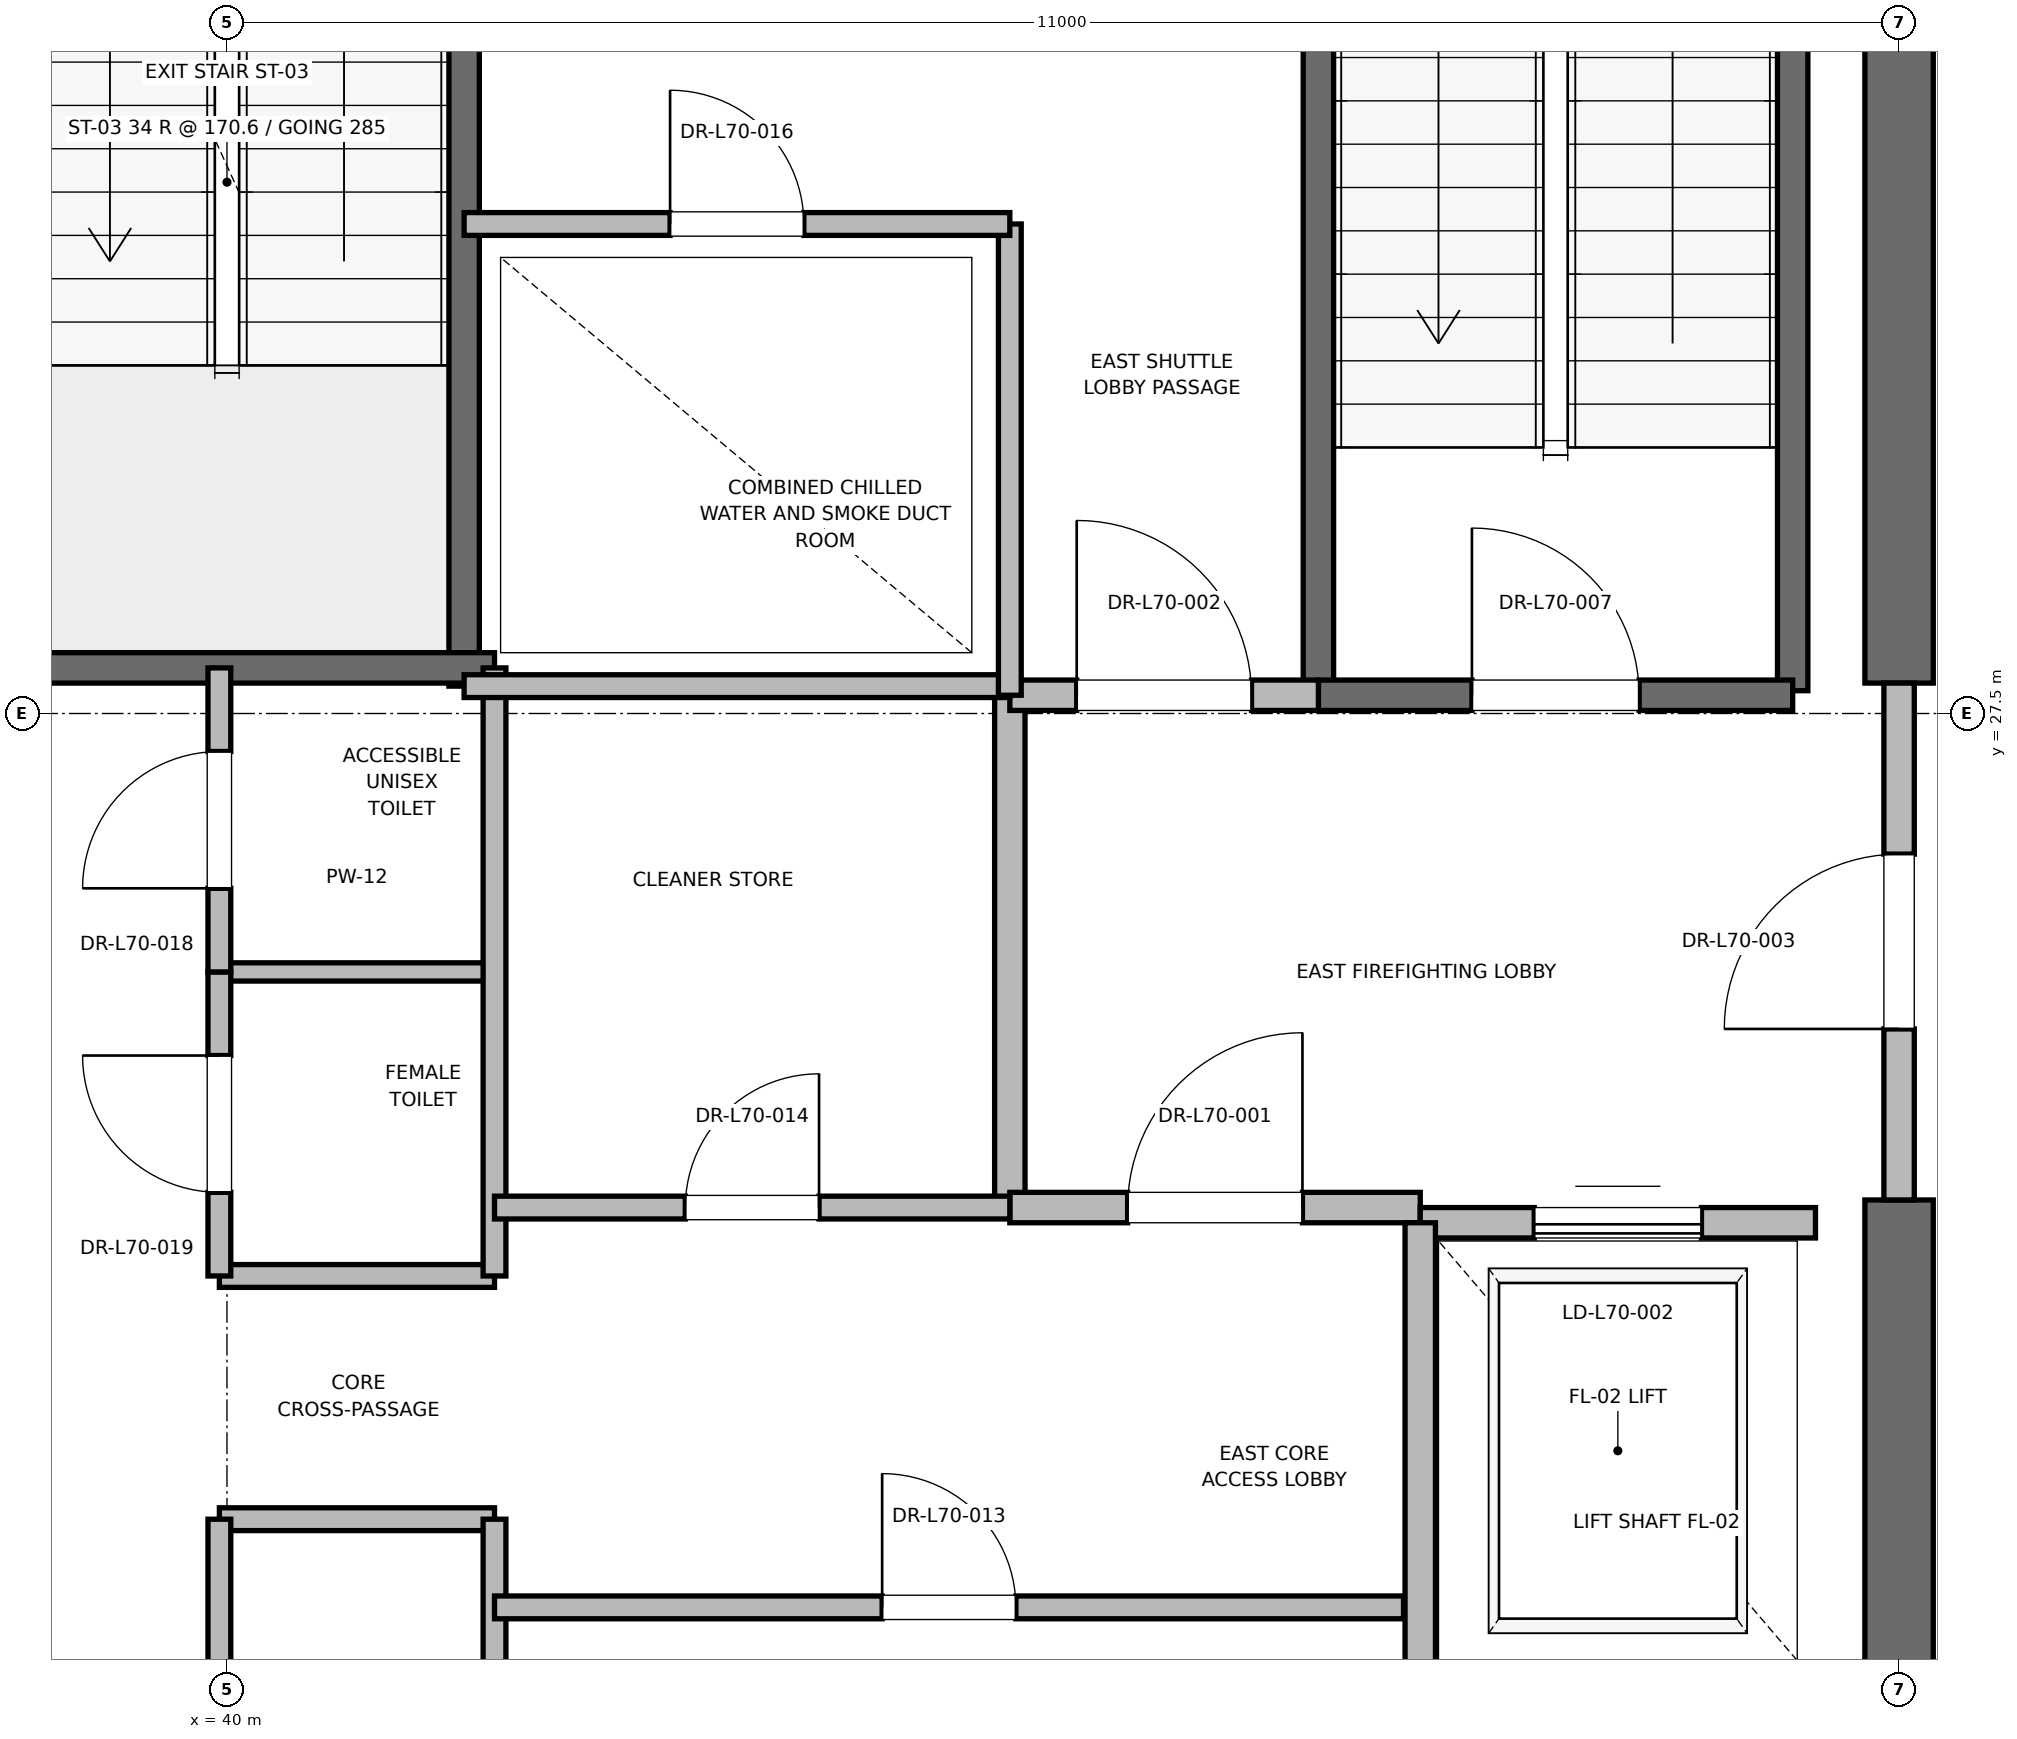
"""IFC4 building model, lengths in metres.
Left out: names, types, materials, properties, quantities, classifications, styles, units other than length and angle.
Written with IfcOpenShell. Run it as: python <this file> out.ifc"""

import sys

from ifc_helpers import new_model, si_unit, direction, frame, frame_2d, origin, place, context, subcontext, project, spatial, rectangle, extrude, element, fill, save


model = new_model("IFC4")
c1 = context("Model", 3, precision=1e-05, world=origin(), true_north=direction((0.0, 1.0)))
c2 = subcontext(c1, "Body", "Model", "MODEL_VIEW")
j1 = project(units=[si_unit("LENGTHUNIT", "METRE"), si_unit("PLANEANGLEUNIT", "RADIAN")], contexts=[c1])
p1 = place(None, origin())
s1 = spatial("IfcSite", under=j1, at=p1, CompositionType="ELEMENT")
p2 = place(p1, origin())
s2 = spatial("IfcBuilding", under=s1, at=p2, CompositionType="ELEMENT")
p3 = place(p2, frame((0.0, 0.0, 301.0)))
s3 = spatial("IfcBuildingStorey", under=s2, at=p3, CompositionType="ELEMENT", Elevation=301.0)
p4 = place(p3, frame((51.0, 18.5, 0.0), z_axis=(0.0, 0.0, 1.0), x_axis=(0.0, 1.0, 0.0)))
e1 = element("IfcWall", 1, at=p4, inside=s3, PredefinedType="SHEAR", context=c2, shape_type="SweptSolid", body=[
    extrude(rectangle(XDim=5.8, YDim=0.45, at=frame_2d((2.9, 0.0))), origin(), (0.0, 0.0, 1.0), 5.585),
])
p5 = place(p3, frame((51.0, 27.7, 0.0), z_axis=(0.0, 0.0, 1.0), x_axis=(0.0, 1.0, 0.0)))
e2 = element("IfcWall", 2, at=p5, inside=s3, PredefinedType="SHEAR", context=c2, shape_type="SweptSolid", body=[
    extrude(rectangle(XDim=8.8, YDim=0.45, at=frame_2d((4.4, 0.0))), origin(), (0.0, 0.0, 1.0), 5.585),
])
p6 = place(p3, frame((50.3, 27.65, 0.0), z_axis=(0.0, 0.0, 1.0), x_axis=(0.0, 1.0, 0.0)))
e3 = element("IfcWall", 3, at=p6, inside=s3, PredefinedType="SOLIDWALL", context=c2, shape_type="SweptSolid", body=[
    extrude(rectangle(XDim=8.15, YDim=0.2, at=frame_2d((4.075, 0.0))), origin(), (0.0, 0.0, 1.0), 5.585),
])
p7 = place(p3, frame((47.18, 27.62, 0.0), z_axis=(0.0, 0.0, 1.0), x_axis=(0.0, 1.0, 0.0)))
e4 = element("IfcWall", 4, at=p7, inside=s3, PredefinedType="SOLIDWALL", context=c2, shape_type="SweptSolid", body=[
    extrude(rectangle(XDim=8.18, YDim=0.2, at=frame_2d((4.09, 0.0))), origin(), (0.0, 0.0, 1.0), 5.585),
])
p8 = place(p3, frame((47.18, 27.62, 0.0), z_axis=(0.0, 0.0, 1.0), x_axis=(1.0, 0.0, 0.0)))
e5 = element("IfcWall", 5, at=p8, inside=s3, PredefinedType="SOLIDWALL", context=c2, shape_type="SweptSolid", body=[
    extrude(rectangle(XDim=3.12, YDim=0.2, at=frame_2d((1.56, 0.0))), origin(), (0.0, 0.0, 1.0), 5.585),
])
p9 = place(p8, frame((1.01, 0.0, 0.0)))
e6 = element("IfcOpeningElement", 6, at=p9, cuts=e5, PredefinedType="OPENING", context=c2, shape_type="SweptSolid", body=[
    extrude(rectangle(XDim=1.1, YDim=2.15, at=frame_2d((0.55, 1.075))), frame((0.0, 0.1, 0.0), z_axis=(0.0, -1.0, 0.0), x_axis=(1.0, 0.0, 0.0)), (0.0, 0.0, 1.0), 0.2),
])
p10 = place(p3, frame((41.56, 27.68, 0.0), z_axis=(0.0, 0.0, 1.0), x_axis=(0.0, 1.0, 0.0)))
e7 = element("IfcWall", 7, at=p10, inside=s3, PredefinedType="SOLIDWALL", context=c2, shape_type="SweptSolid", body=[
    extrude(rectangle(XDim=8.57, YDim=0.2, at=frame_2d((4.285, 0.0))), origin(), (0.0, 0.0, 1.0), 5.585),
])
p11 = place(p3, frame((38.44, 27.8, 0.0), z_axis=(0.0, 0.0, 1.0), x_axis=(1.0, 0.0, 0.0)))
e8 = element("IfcWall", 8, at=p11, inside=s3, PredefinedType="SOLIDWALL", context=c2, shape_type="SweptSolid", body=[
    extrude(rectangle(XDim=3.32, YDim=0.2, at=frame_2d((1.66, 0.0))), origin(), (0.0, 0.0, 1.0), 5.585),
])
p12 = place(p3, frame((45.15, 24.25, 0.0), z_axis=(0.0, 0.0, 1.0), x_axis=(0.0, 1.0, 0.0)))
e9 = element("IfcWall", 9, at=p12, inside=s3, PredefinedType="PARTITIONING", context=c2, shape_type="SweptSolid", body=[
    extrude(rectangle(XDim=3.37, YDim=0.2, at=frame_2d((1.685, 0.0))), origin(), (0.0, 0.0, 1.0), 5.585),
])
p13 = place(p3, frame((45.15, 24.25, 0.0), z_axis=(0.0, 0.0, 1.0), x_axis=(1.0, 0.0, 0.0)))
e10 = element("IfcWall", 10, at=p13, inside=s3, PredefinedType="PARTITIONING", context=c2, shape_type="SweptSolid", body=[
    extrude(rectangle(XDim=2.7, YDim=0.2, at=frame_2d((1.35, 0.0))), origin(), (0.0, 0.0, 1.0), 5.585),
])
p14 = place(p13, frame((0.775, 0.0, 0.0)))
e11 = element("IfcOpeningElement", 11, at=p14, cuts=e10, PredefinedType="OPENING", context=c2, shape_type="SweptSolid", body=[
    extrude(rectangle(XDim=1.15, YDim=2.2, at=frame_2d((0.575, 1.1))), frame((0.0, 0.1, 0.0), z_axis=(0.0, -1.0, 0.0), x_axis=(1.0, 0.0, 0.0)), (0.0, 0.0, 1.0), 0.2),
])
p15 = place(p3, frame((45.15, 27.62, 0.0), z_axis=(0.0, 0.0, 1.0), x_axis=(1.0, 0.0, 0.0)))
e12 = element("IfcWall", 12, at=p15, inside=s3, PredefinedType="PARTITIONING", context=c2, shape_type="SweptSolid", body=[
    extrude(rectangle(XDim=2.03, YDim=0.2, at=frame_2d((1.015, 0.0))), origin(), (0.0, 0.0, 1.0), 5.585),
])
p16 = place(p15, frame((0.44, 0.0, 0.0)))
e13 = element("IfcOpeningElement", 13, at=p16, cuts=e12, PredefinedType="OPENING", context=c2, shape_type="SweptSolid", body=[
    extrude(rectangle(XDim=1.15, YDim=2.2, at=frame_2d((0.575, 1.1))), frame((0.0, 0.1, 0.0), z_axis=(0.0, -1.0, 0.0), x_axis=(1.0, 0.0, 0.0)), (0.0, 0.0, 1.0), 0.2),
])
p17 = place(p3, frame((51.0, 24.3, 0.0), z_axis=(0.0, 0.0, 1.0), x_axis=(0.0, 1.0, 0.0)))
e14 = element("IfcWall", 14, at=p17, inside=s3, PredefinedType="PARTITIONING", context=c2, shape_type="SweptSolid", body=[
    extrude(rectangle(XDim=3.4, YDim=0.2, at=frame_2d((1.7, 0.0))), origin(), (0.0, 0.0, 1.0), 4.665),
])
p18 = place(p17, frame((1.125, 0.0, 0.0)))
e15 = element("IfcOpeningElement", 15, at=p18, cuts=e14, PredefinedType="OPENING", context=c2, shape_type="SweptSolid", body=[
    extrude(rectangle(XDim=1.15, YDim=2.2, at=frame_2d((0.575, 1.1))), frame((0.0, 0.1, 0.0), z_axis=(0.0, -1.0, 0.0), x_axis=(1.0, 0.0, 0.0)), (0.0, 0.0, 1.0), 0.2),
])
p19 = place(p3, frame((50.45, 24.15, 0.0), z_axis=(0.0, 0.0, 1.0), x_axis=(-1.0, 0.0, 0.0)))
e16 = element("IfcWall", 16, at=p19, inside=s3, PredefinedType="SOLIDWALL", context=c2, shape_type="SweptSolid", body=[
    extrude(rectangle(XDim=2.6, YDim=0.2, at=frame_2d((1.3, 0.0))), origin(), (0.0, 0.0, 1.0), 4.665),
])
p20 = place(p19, frame((0.75, 0.0, 0.0)))
e17 = element("IfcOpeningElement", 17, at=p20, cuts=e16, PredefinedType="OPENING", context=c2, shape_type="SweptSolid", body=[
    extrude(rectangle(XDim=1.1, YDim=2.2, at=frame_2d((0.55, 1.1))), frame((0.0, 0.1, 0.0), z_axis=(0.0, -1.0, 0.0), x_axis=(1.0, 0.0, 0.0)), (0.0, 0.0, 1.0), 0.2),
])
p21 = place(p3, frame((47.85, 24.15, 0.0), z_axis=(0.0, 0.0, 1.0), x_axis=(0.0, -1.0, 0.0)))
e18 = element("IfcWall", 18, at=p21, inside=s3, PredefinedType="SOLIDWALL", context=c2, shape_type="SweptSolid", body=[
    extrude(rectangle(XDim=3.0, YDim=0.2, at=frame_2d((1.5, 0.0))), origin(), (0.0, 0.0, 1.0), 5.585),
])
for number, where, z_axis, x_axis in (
    (19, (39.95, 22.2, 0.0), (0.0, 0.0, 1.0), (1.0, 0.0, 0.0)),
    (20, (39.95, 23.8, 0.0), (0.0, 0.0, 1.0), (1.0, 0.0, 0.0)),
):
    element("IfcWall", number, at=place(p3, frame(where, z_axis=z_axis, x_axis=x_axis)), inside=s3, PredefinedType="PARTITIONING", context=c2, shape_type="SweptSolid", body=[
        extrude(rectangle(XDim=1.81, YDim=0.15, at=frame_2d((0.905, 0.0))), origin(), (0.0, 0.0, 1.0), 2.85),
    ])
p22 = place(p3, frame((39.95, 25.8, 0.0), z_axis=(0.0, 0.0, 1.0), x_axis=(1.0, 0.0, 0.0)))
e21 = element("IfcWall", 21, at=p22, inside=s3, PredefinedType="PARTITIONING", context=c2, shape_type="SweptSolid", body=[
    extrude(rectangle(XDim=1.81, YDim=0.12, at=frame_2d((0.905, 0.0))), origin(), (0.0, 0.0, 1.0), 2.85),
])
p23 = place(p3, frame((41.76, 18.6, 0.0), z_axis=(0.0, 0.0, 1.0), x_axis=(0.0, 1.0, 0.0)))
e22 = element("IfcWall", 22, at=p23, inside=s3, PredefinedType="PARTITIONING", context=c2, shape_type="SweptSolid", body=[
    extrude(rectangle(XDim=3.6, YDim=0.15, at=frame_2d((1.8, 0.0))), origin(), (0.0, 0.0, 1.0), 2.85),
])
p24 = place(p3, frame((41.76, 23.8, 0.0), z_axis=(0.0, 0.0, 1.0), x_axis=(0.0, 1.0, 0.0)))
e23 = element("IfcWall", 23, at=p24, inside=s3, PredefinedType="PARTITIONING", context=c2, shape_type="SweptSolid", body=[
    extrude(rectangle(XDim=4.0, YDim=0.15, at=frame_2d((2.0, 0.0))), origin(), (0.0, 0.0, 1.0), 2.85),
])
p25 = place(p3, frame((39.95, 19.2, 0.0), z_axis=(0.0, 0.0, 1.0), x_axis=(0.0, 1.0, 0.0)))
e24 = element("IfcWall", 24, at=p25, inside=s3, PredefinedType="PARTITIONING", context=c2, shape_type="SweptSolid", body=[
    extrude(rectangle(XDim=3.0, YDim=0.15, at=frame_2d((1.5, 0.0))), origin(), (0.0, 0.0, 1.0), 2.85),
])
p26 = place(p25, frame((1.05, 0.0, 0.0)))
e25 = element("IfcOpeningElement", 25, at=p26, cuts=e24, PredefinedType="OPENING", context=c2, shape_type="SweptSolid", body=[
    extrude(rectangle(XDim=0.9, YDim=2.1, at=frame_2d((0.45, 1.05))), frame((0.0, 0.075, 0.0), z_axis=(0.0, -1.0, 0.0), x_axis=(1.0, 0.0, 0.0)), (0.0, 0.0, 1.0), 0.15),
])
p27 = place(p3, frame((39.95, 23.8, 0.0), z_axis=(0.0, 0.0, 1.0), x_axis=(0.0, 1.0, 0.0)))
e26 = element("IfcWall", 26, at=p27, inside=s3, PredefinedType="PARTITIONING", context=c2, shape_type="SweptSolid", body=[
    extrude(rectangle(XDim=2.0, YDim=0.15, at=frame_2d((1.0, 0.0))), origin(), (0.0, 0.0, 1.0), 2.85),
])
p28 = place(p27, frame((0.55, 0.0, 0.0)))
e27 = element("IfcOpeningElement", 27, at=p28, cuts=e26, PredefinedType="OPENING", context=c2, shape_type="SweptSolid", body=[
    extrude(rectangle(XDim=0.9, YDim=2.1, at=frame_2d((0.45, 1.05))), frame((0.0, 0.075, 0.0), z_axis=(0.0, -1.0, 0.0), x_axis=(1.0, 0.0, 0.0)), (0.0, 0.0, 1.0), 0.15),
])
p29 = place(p3, frame((39.95, 25.8, 0.0), z_axis=(0.0, 0.0, 1.0), x_axis=(0.0, 1.0, 0.0)))
e28 = element("IfcWall", 28, at=p29, inside=s3, PredefinedType="PARTITIONING", context=c2, shape_type="SweptSolid", body=[
    extrude(rectangle(XDim=2.0, YDim=0.15, at=frame_2d((1.0, 0.0))), origin(), (0.0, 0.0, 1.0), 2.85),
])
p30 = place(p29, frame((0.55, 0.0, 0.0)))
e29 = element("IfcOpeningElement", 29, at=p30, cuts=e28, PredefinedType="OPENING", context=c2, shape_type="SweptSolid", body=[
    extrude(rectangle(XDim=0.9, YDim=2.1, at=frame_2d((0.45, 1.05))), frame((0.0, 0.075, 0.0), z_axis=(0.0, -1.0, 0.0), x_axis=(1.0, 0.0, 0.0)), (0.0, 0.0, 1.0), 0.15),
])
p31 = place(p3, frame((41.56, 27.68, 0.0), z_axis=(0.0, 0.0, 1.0), x_axis=(1.0, 0.0, 0.0)))
e30 = element("IfcWall", 30, at=p31, inside=s3, PredefinedType="PARTITIONING", context=c2, shape_type="SweptSolid", body=[
    extrude(rectangle(XDim=3.59, YDim=0.15, at=frame_2d((1.795, 0.0))), origin(), (0.0, 0.0, 1.0), 2.85),
])
p32 = place(p3, frame((41.76, 21.62, 0.0), z_axis=(0.0, 0.0, 1.0), x_axis=(1.0, 0.0, 0.0)))
e31 = element("IfcWall", 31, at=p32, inside=s3, PredefinedType="PARTITIONING", context=c2, shape_type="SweptSolid", body=[
    extrude(rectangle(XDim=5.98, YDim=0.15, at=frame_2d((2.99, 0.0))), origin(), (0.0, 0.0, 1.0), 2.85),
])
p33 = place(p32, frame((2.55, 0.0, 0.0)))
e32 = element("IfcOpeningElement", 32, at=p33, cuts=e31, PredefinedType="OPENING", context=c2, shape_type="SweptSolid", body=[
    extrude(rectangle(XDim=0.88, YDim=2.1, at=frame_2d((0.44, 1.05))), frame((0.0, 0.075, 0.0), z_axis=(0.0, -1.0, 0.0), x_axis=(1.0, 0.0, 0.0)), (0.0, 0.0, 1.0), 0.15),
])
p34 = place(p3, frame((41.76, 24.25, 0.0), z_axis=(0.0, 0.0, 1.0), x_axis=(1.0, 0.0, 0.0)))
e33 = element("IfcWall", 33, at=p34, inside=s3, PredefinedType="PARTITIONING", context=c2, shape_type="SweptSolid", body=[
    extrude(rectangle(XDim=3.39, YDim=0.15, at=frame_2d((1.695, 0.0))), origin(), (0.0, 0.0, 1.0), 2.85),
])
p35 = place(p34, frame((1.255, 0.0, 0.0)))
e34 = element("IfcOpeningElement", 34, at=p35, cuts=e33, PredefinedType="OPENING", context=c2, shape_type="SweptSolid", body=[
    extrude(rectangle(XDim=0.88, YDim=2.1, at=frame_2d((0.44, 1.05))), frame((0.0, 0.075, 0.0), z_axis=(0.0, -1.0, 0.0), x_axis=(1.0, 0.0, 0.0)), (0.0, 0.0, 1.0), 0.15),
])
p36 = place(p3, frame((45.15, 27.62, 0.0), z_axis=(0.0, 0.0, 1.0), x_axis=(0.0, 1.0, 0.0)))
e35 = element("IfcWall", 35, at=p36, inside=s3, PredefinedType="PARTITIONING", context=c2, shape_type="SweptSolid", body=[
    extrude(rectangle(XDim=3.1, YDim=0.15, at=frame_2d((1.55, 0.0))), origin(), (0.0, 0.0, 1.0), 2.85),
])
p37 = place(p3, frame((41.56, 30.72, 0.0), z_axis=(0.0, 0.0, 1.0), x_axis=(1.0, 0.0, 0.0)))
e36 = element("IfcWall", 36, at=p37, inside=s3, PredefinedType="PARTITIONING", context=c2, shape_type="SweptSolid", body=[
    extrude(rectangle(XDim=3.59, YDim=0.15, at=frame_2d((1.795, 0.0))), origin(), (0.0, 0.0, 1.0), 2.85),
])
p38 = place(p37, frame((1.355, 0.0, 0.0)))
e37 = element("IfcOpeningElement", 37, at=p38, cuts=e36, PredefinedType="OPENING", context=c2, shape_type="SweptSolid", body=[
    extrude(rectangle(XDim=0.88, YDim=2.1, at=frame_2d((0.44, 1.05))), frame((0.0, 0.075, 0.0), z_axis=(0.0, -1.0, 0.0), x_axis=(1.0, 0.0, 0.0)), (0.0, 0.0, 1.0), 0.15),
])
p39 = place(p9, origin())
e38 = element("IfcDoor", 38, at=p39, inside=s3, OperationType="SINGLE_SWING_LEFT", PredefinedType="DOOR", context=c2, shape_type="SweptSolid", body=[
    extrude(rectangle(XDim=1.1, YDim=2.15, at=frame_2d((0.55, 1.075))), frame((0.0, 0.025, 0.0), z_axis=(0.0, -1.0, 0.0), x_axis=(1.0, 0.0, 0.0)), (0.0, 0.0, 1.0), 0.05),
])
fill(e6, e38)
p40 = place(p14, origin())
e39 = element("IfcDoor", 39, at=p40, inside=s3, OperationType="SINGLE_SWING_RIGHT", PredefinedType="DOOR", context=c2, shape_type="SweptSolid", body=[
    extrude(rectangle(XDim=1.15, YDim=2.2, at=frame_2d((0.575, 1.1))), frame((0.0, 0.025, 0.0), z_axis=(0.0, -1.0, 0.0), x_axis=(1.0, 0.0, 0.0)), (0.0, 0.0, 1.0), 0.05),
])
fill(e11, e39)
p41 = place(p16, origin())
e40 = element("IfcDoor", 40, at=p41, inside=s3, OperationType="SINGLE_SWING_LEFT", PredefinedType="DOOR", context=c2, shape_type="SweptSolid", body=[
    extrude(rectangle(XDim=1.15, YDim=2.2, at=frame_2d((0.575, 1.1))), frame((0.0, 0.025, 0.0), z_axis=(0.0, -1.0, 0.0), x_axis=(1.0, 0.0, 0.0)), (0.0, 0.0, 1.0), 0.05),
])
fill(e13, e40)
p42 = place(p18, origin())
e41 = element("IfcDoor", 41, at=p42, inside=s3, OperationType="SINGLE_SWING_LEFT", PredefinedType="DOOR", context=c2, shape_type="SweptSolid", body=[
    extrude(rectangle(XDim=1.15, YDim=2.2, at=frame_2d((0.575, 1.1))), frame((0.0, 0.025, 0.0), z_axis=(0.0, -1.0, 0.0), x_axis=(1.0, 0.0, 0.0)), (0.0, 0.0, 1.0), 0.05),
])
fill(e15, e41)
p43 = place(p20, origin())
e42 = element("IfcDoor", 42, at=p43, inside=s3, OperationType="SLIDING_TO_RIGHT", PredefinedType="DOOR", context=c2, shape_type="SweptSolid", body=[
    extrude(rectangle(XDim=1.1, YDim=2.2, at=frame_2d((0.55, 1.1))), frame((0.0, 0.025, 0.0), z_axis=(0.0, -1.0, 0.0), x_axis=(1.0, 0.0, 0.0)), (0.0, 0.0, 1.0), 0.05),
])
fill(e17, e42)
p44 = place(p28, origin())
e43 = element("IfcDoor", 43, at=p44, inside=s3, OperationType="SINGLE_SWING_RIGHT", PredefinedType="DOOR", context=c2, shape_type="SweptSolid", body=[
    extrude(rectangle(XDim=0.9, YDim=2.1, at=frame_2d((0.45, 1.05))), frame((0.0, 0.025, 0.0), z_axis=(0.0, -1.0, 0.0), x_axis=(1.0, 0.0, 0.0)), (0.0, 0.0, 1.0), 0.05),
])
fill(e27, e43)
p45 = place(p30, origin())
e44 = element("IfcDoor", 44, at=p45, inside=s3, OperationType="SINGLE_SWING_LEFT", PredefinedType="DOOR", context=c2, shape_type="SweptSolid", body=[
    extrude(rectangle(XDim=0.9, YDim=2.1, at=frame_2d((0.45, 1.05))), frame((0.0, 0.025, 0.0), z_axis=(0.0, -1.0, 0.0), x_axis=(1.0, 0.0, 0.0)), (0.0, 0.0, 1.0), 0.05),
])
fill(e29, e44)
p46 = place(p33, origin())
e45 = element("IfcDoor", 45, at=p46, inside=s3, OperationType="SINGLE_SWING_LEFT", PredefinedType="DOOR", context=c2, shape_type="SweptSolid", body=[
    extrude(rectangle(XDim=0.88, YDim=2.1, at=frame_2d((0.44, 1.05))), frame((0.0, 0.025, 0.0), z_axis=(0.0, -1.0, 0.0), x_axis=(1.0, 0.0, 0.0)), (0.0, 0.0, 1.0), 0.05),
])
fill(e32, e45)
p47 = place(p35, origin())
e46 = element("IfcDoor", 46, at=p47, inside=s3, OperationType="SINGLE_SWING_RIGHT", PredefinedType="DOOR", context=c2, shape_type="SweptSolid", body=[
    extrude(rectangle(XDim=0.88, YDim=2.1, at=frame_2d((0.44, 1.05))), frame((0.0, 0.025, 0.0), z_axis=(0.0, -1.0, 0.0), x_axis=(1.0, 0.0, 0.0)), (0.0, 0.0, 1.0), 0.05),
])
fill(e34, e46)
p48 = place(p38, origin())
e47 = element("IfcDoor", 47, at=p48, inside=s3, OperationType="SINGLE_SWING_LEFT", PredefinedType="DOOR", context=c2, shape_type="SweptSolid", body=[
    extrude(rectangle(XDim=0.88, YDim=2.1, at=frame_2d((0.44, 1.05))), frame((0.0, 0.025, 0.0), z_axis=(0.0, -1.0, 0.0), x_axis=(1.0, 0.0, 0.0)), (0.0, 0.0, 1.0), 0.05),
])
fill(e37, e47)
save(model, sys.argv[1])
